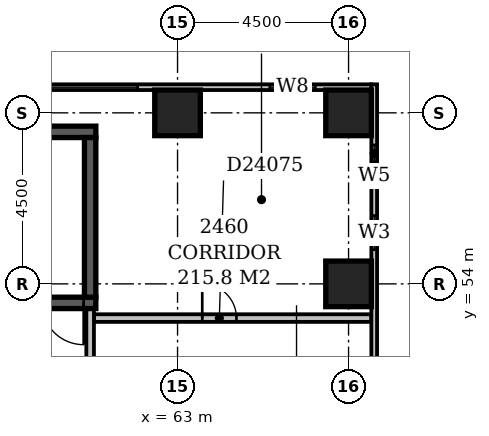
"""IFC4 building model, lengths in metres.
Left out: names, types, materials, properties, quantities, classifications, styles, units other than length and angle.
Written with IfcOpenShell. Run it as: python <this file> out.ifc"""

import sys

from ifc_helpers import new_model, si_unit, direction, frame, frame_2d, origin, origin_2d, place, context, subcontext, project, spatial, rectangle, extrude, element, fill, save


model = new_model("IFC4")
c1 = context("Model", 3, precision=1e-05, world=origin(), true_north=direction((0.0, 1.0)))
c2 = subcontext(c1, "Body", "Model", "MODEL_VIEW")
j1 = project(units=[si_unit("LENGTHUNIT", "METRE"), si_unit("PLANEANGLEUNIT", "RADIAN")], contexts=[c1])
p1 = place(None, origin())
s1 = spatial("IfcSite", under=j1, at=p1, CompositionType="ELEMENT")
p2 = place(p1, origin())
s2 = spatial("IfcBuilding", under=s1, at=p2, CompositionType="ELEMENT")
p3 = place(p2, frame((0.0, 0.0, 97.4)))
s3 = spatial("IfcBuildingStorey", under=s2, at=p3, CompositionType="ELEMENT", Elevation=97.4)
p4 = place(p3, frame((53.85, 53.5, -0.3), z_axis=(0.0, 0.0, 1.0), x_axis=(1.0, 0.0, 0.0)))
e1 = element("IfcWall", 1, at=p4, inside=s3, PredefinedType="SHEAR", context=c2, shape_type="SweptSolid", body=[
    extrude(rectangle(XDim=7.0, YDim=0.3, at=frame_2d((3.5, 0.0))), origin(), (0.0, 0.0, 1.0), 3.6),
])
p5 = place(p4, frame((5.58, 0.0, 0.3)))
e2 = element("IfcOpeningElement", 2, at=p5, cuts=e1, PredefinedType="OPENING", context=c2, shape_type="SweptSolid", body=[
    extrude(rectangle(XDim=1.1, YDim=2.1, at=frame_2d((0.55, 1.05))), frame((0.0, 0.162, 0.0), z_axis=(0.0, -1.0, 0.0), x_axis=(1.0, 0.0, 0.0)), (0.0, 0.0, 1.0), 0.324),
])
p6 = place(p3, frame((53.85, 58.0, -0.3), z_axis=(0.0, 0.0, 1.0), x_axis=(1.0, 0.0, 0.0)))
e3 = element("IfcWall", 3, at=p6, inside=s3, PredefinedType="SHEAR", context=c2, shape_type="SweptSolid", body=[
    extrude(rectangle(XDim=7.0, YDim=0.3, at=frame_2d((3.5, 0.0))), origin(), (0.0, 0.0, 1.0), 3.6),
])
p7 = place(p3, frame((60.7, 53.65, -0.3), z_axis=(0.0, 0.0, 1.0), x_axis=(0.0, 1.0, 0.0)))
e4 = element("IfcWall", 4, at=p7, inside=s3, PredefinedType="SHEAR", context=c2, shape_type="SweptSolid", body=[
    extrude(rectangle(XDim=4.2, YDim=0.3, at=frame_2d((2.1, 0.0))), origin(), (0.0, 0.0, 1.0), 3.6),
])
for number, where, z_axis, x_axis in (
    (5, (67.5, 54.0, -0.3), (0.0, 0.0, 1.0), (1.0, 0.0, 0.0)),
    (6, (63.0, 58.5, -0.3), (0.0, 0.0, 1.0), (1.0, 0.0, 0.0)),
    (7, (67.5, 58.5, -0.3), (0.0, 0.0, 1.0), (1.0, 0.0, 0.0)),
):
    element("IfcColumn", number, at=place(p3, frame(where, z_axis=z_axis, x_axis=x_axis)), inside=s3, PredefinedType="COLUMN", context=c2, shape_type="SweptSolid", body=[
        extrude(rectangle(XDim=1.2, YDim=1.2, at=origin_2d()), origin(), (0.0, 0.0, 1.0), 3.6),
    ])
p8 = place(p3, frame((68.175, 35.4, 0.0), z_axis=(0.0, 0.0, 1.0), x_axis=(0.0, 1.0, 0.0)))
e8 = element("IfcWall", 8, at=p8, inside=s3, PredefinedType="STANDARD", context=c2, shape_type="SweptSolid", body=[
    extrude(rectangle(XDim=23.85, YDim=0.15, at=frame_2d((11.925, 0.0))), origin(), (0.0, 0.0, 1.0), 2.7),
])
p9 = place(p8, frame((1.474, 0.0, 0.6)))
e9 = element("IfcOpeningElement", 9, at=p9, cuts=e8, PredefinedType="OPENING", context=c2, shape_type="SweptSolid", body=[
    extrude(rectangle(XDim=1.2, YDim=1.8, at=frame_2d((0.6, 0.9))), frame((0.0, 0.087, 0.0), z_axis=(0.0, -1.0, 0.0), x_axis=(1.0, 0.0, 0.0)), (0.0, 0.0, 1.0), 0.174),
])
p10 = place(p8, frame((10.65, 0.0, 0.6)))
e10 = element("IfcOpeningElement", 10, at=p10, cuts=e8, PredefinedType="OPENING", context=c2, shape_type="SweptSolid", body=[
    extrude(rectangle(XDim=2.4, YDim=1.8, at=frame_2d((1.2, 0.9))), frame((0.0, 0.087, 0.0), z_axis=(0.0, -1.0, 0.0), x_axis=(1.0, 0.0, 0.0)), (0.0, 0.0, 1.0), 0.174),
])
p11 = place(p8, frame((19.498, 0.0, 0.6)))
e11 = element("IfcOpeningElement", 11, at=p11, cuts=e8, PredefinedType="OPENING", context=c2, shape_type="SweptSolid", body=[
    extrude(rectangle(XDim=0.9, YDim=1.8, at=frame_2d((0.45, 0.9))), frame((0.0, 0.087, 0.0), z_axis=(0.0, -1.0, 0.0), x_axis=(1.0, 0.0, 0.0)), (0.0, 0.0, 1.0), 0.174),
])
p12 = place(p8, frame((21.806, 0.0, 0.6)))
e12 = element("IfcOpeningElement", 12, at=p12, cuts=e8, PredefinedType="OPENING", context=c2, shape_type="SweptSolid", body=[
    extrude(rectangle(XDim=0.45, YDim=1.8, at=frame_2d((0.225, 0.9))), frame((0.0, 0.087, 0.0), z_axis=(0.0, -1.0, 0.0), x_axis=(1.0, 0.0, 0.0)), (0.0, 0.0, 1.0), 0.174),
])
p13 = place(p3, frame((68.1, 59.175, 0.0), z_axis=(0.0, 0.0, 1.0), x_axis=(-1.0, 0.0, 0.0)))
e13 = element("IfcWall", 13, at=p13, inside=s3, PredefinedType="STANDARD", context=c2, shape_type="SweptSolid", body=[
    extrude(rectangle(XDim=68.85, YDim=0.15, at=frame_2d((34.425, 0.0))), origin(), (0.0, 0.0, 1.0), 2.7),
])
p14 = place(p13, frame((1.474, 0.0, 0.6)))
e14 = element("IfcOpeningElement", 14, at=p14, cuts=e13, PredefinedType="OPENING", context=c2, shape_type="SweptSolid", body=[
    extrude(rectangle(XDim=1.2, YDim=1.8, at=frame_2d((0.6, 0.9))), frame((0.0, 0.087, 0.0), z_axis=(0.0, -1.0, 0.0), x_axis=(1.0, 0.0, 0.0)), (0.0, 0.0, 1.0), 0.174),
])
p15 = place(p13, frame((6.15, 0.0, 0.6)))
e15 = element("IfcOpeningElement", 15, at=p15, cuts=e13, PredefinedType="OPENING", context=c2, shape_type="SweptSolid", body=[
    extrude(rectangle(XDim=2.4, YDim=1.8, at=frame_2d((1.2, 0.9))), frame((0.0, 0.087, 0.0), z_axis=(0.0, -1.0, 0.0), x_axis=(1.0, 0.0, 0.0)), (0.0, 0.0, 1.0), 0.174),
])
p16 = place(p3, frame((60.7, 51.6, 0.0), z_axis=(0.0, 0.0, 1.0), x_axis=(0.0, 1.0, 0.0)))
e16 = element("IfcWall", 16, at=p16, inside=s3, PredefinedType="PARTITIONING", context=c2, shape_type="SweptSolid", body=[
    extrude(rectangle(XDim=1.73, YDim=0.2, at=frame_2d((0.865, 0.0))), origin(), (0.0, 0.0, 1.0), 3.3),
])
p17 = place(p3, frame((60.8, 53.1, 0.0), z_axis=(0.0, 0.0, 1.0), x_axis=(1.0, 0.0, 0.0)))
e17 = element("IfcWall", 17, at=p17, inside=s3, PredefinedType="PARTITIONING", context=c2, shape_type="SweptSolid", body=[
    extrude(rectangle(XDim=7.3, YDim=0.2, at=frame_2d((3.65, 0.0))), origin(), (0.0, 0.0, 1.0), 3.3),
])
p18 = place(p17, frame((2.85, 0.0, 0.0)))
e18 = element("IfcOpeningElement", 18, at=p18, cuts=e17, PredefinedType="OPENING", context=c2, shape_type="SweptSolid", body=[
    extrude(rectangle(XDim=0.9, YDim=2.1, at=frame_2d((0.45, 1.05))), frame((0.0, 0.112, 0.0), z_axis=(0.0, -1.0, 0.0), x_axis=(1.0, 0.0, 0.0)), (0.0, 0.0, 1.0), 0.224),
])
p19 = place(p11, origin())
e19 = element("IfcWindow", 19, at=p19, inside=s3, PartitioningType="SINGLE_PANEL", PredefinedType="WINDOW", context=c2, shape_type="SweptSolid", body=[
    extrude(rectangle(XDim=0.9, YDim=1.8, at=frame_2d((0.45, 0.9))), frame((0.0, 0.03, 0.0), z_axis=(0.0, -1.0, 0.0), x_axis=(1.0, 0.0, 0.0)), (0.0, 0.0, 1.0), 0.06),
])
fill(e11, e19)
p20 = place(p12, origin())
e20 = element("IfcWindow", 20, at=p20, inside=s3, PartitioningType="SINGLE_PANEL", PredefinedType="WINDOW", context=c2, shape_type="SweptSolid", body=[
    extrude(rectangle(XDim=0.45, YDim=1.8, at=frame_2d((0.225, 0.9))), frame((0.0, 0.03, 0.0), z_axis=(0.0, -1.0, 0.0), x_axis=(1.0, 0.0, 0.0)), (0.0, 0.0, 1.0), 0.06),
])
fill(e12, e20)
p21 = place(p14, origin())
e21 = element("IfcWindow", 21, at=p21, inside=s3, PartitioningType="SINGLE_PANEL", PredefinedType="WINDOW", context=c2, shape_type="SweptSolid", body=[
    extrude(rectangle(XDim=1.2, YDim=1.8, at=frame_2d((0.6, 0.9))), frame((0.0, 0.03, 0.0), z_axis=(0.0, -1.0, 0.0), x_axis=(1.0, 0.0, 0.0)), (0.0, 0.0, 1.0), 0.06),
])
fill(e14, e21)
p22 = place(p15, origin())
e22 = element("IfcWindow", 22, at=p22, inside=s3, PartitioningType="SINGLE_PANEL", PredefinedType="WINDOW", context=c2, shape_type="SweptSolid", body=[
    extrude(rectangle(XDim=2.4, YDim=1.8, at=frame_2d((1.2, 0.9))), frame((0.0, 0.03, 0.0), z_axis=(0.0, -1.0, 0.0), x_axis=(1.0, 0.0, 0.0)), (0.0, 0.0, 1.0), 0.06),
])
fill(e15, e22)
p23 = place(p5, origin())
e23 = element("IfcDoor", 23, at=p23, inside=s3, OperationType="SINGLE_SWING_RIGHT", PredefinedType="DOOR", context=c2, shape_type="SweptSolid", body=[
    extrude(rectangle(XDim=1.1, YDim=2.1, at=frame_2d((0.55, 1.05))), frame((0.0, 0.025, 0.0), z_axis=(0.0, -1.0, 0.0), x_axis=(1.0, 0.0, 0.0)), (0.0, 0.0, 1.0), 0.05),
])
fill(e2, e23)
p24 = place(p18, origin())
e24 = element("IfcDoor", 24, at=p24, inside=s3, OperationType="SINGLE_SWING_LEFT", PredefinedType="DOOR", context=c2, shape_type="SweptSolid", body=[
    extrude(rectangle(XDim=0.9, YDim=2.1, at=frame_2d((0.45, 1.05))), frame((0.0, 0.025, 0.0), z_axis=(0.0, -1.0, 0.0), x_axis=(1.0, 0.0, 0.0)), (0.0, 0.0, 1.0), 0.05),
])
fill(e18, e24)
save(model, sys.argv[1])
